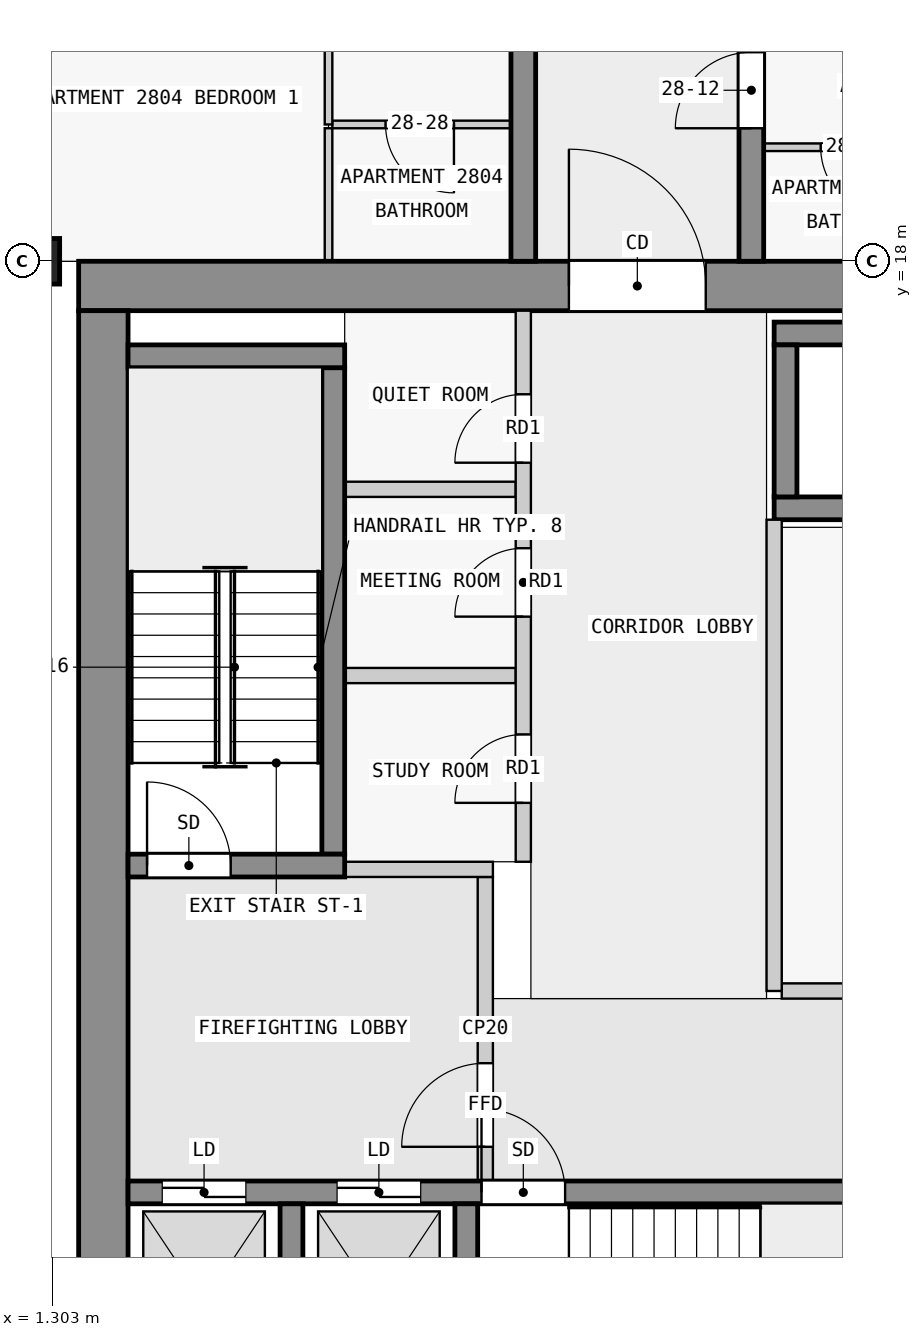
"""IFC4 building model, lengths in metres.
Left out: names, types, materials, properties, quantities, classifications, styles, units other than length and angle.
Written with IfcOpenShell. Run it as: python <this file> out.ifc"""

import sys

from ifc_helpers import new_model, si_unit, direction, frame, frame_2d, origin, origin_2d, place, context, subcontext, project, spatial, rectangle, extrude, element, fill, save


model = new_model("IFC4")
c1 = context("Model", 3, precision=1e-05, world=origin(), true_north=direction((0.0, 1.0)))
c2 = subcontext(c1, "Body", "Model", "MODEL_VIEW")
j1 = project(units=[si_unit("LENGTHUNIT", "METRE"), si_unit("PLANEANGLEUNIT", "RADIAN")], contexts=[c1])
p1 = place(None, origin())
s1 = spatial("IfcSite", under=j1, at=p1, CompositionType="ELEMENT")
p2 = place(p1, origin())
s2 = spatial("IfcBuilding", under=s1, at=p2, CompositionType="ELEMENT")
p3 = place(p2, frame((0.0, 0.0, 109.8)))
s3 = spatial("IfcBuildingStorey", under=s2, at=p3, CompositionType="ELEMENT", Elevation=109.8)
p4 = place(p3, frame((0.7, 18.0, 0.0), z_axis=(0.0, 0.0, 1.0), x_axis=(0.0, 1.0, 0.0)))
e1 = element("IfcColumn", 1, at=p4, inside=s3, PredefinedType="COLUMN", context=c2, shape_type="SweptSolid", body=[
    extrude(rectangle(XDim=0.6, YDim=1.4, at=origin_2d()), origin(), (0.0, 0.0, 1.0), 3.5),
])
p5 = place(p3, frame((1.65, 17.675, 0.0), z_axis=(0.0, 0.0, 1.0), x_axis=(1.0, 0.0, 0.0)))
e2 = element("IfcWall", 2, at=p5, inside=s3, PredefinedType="SHEAR", context=c2, shape_type="SweptSolid", body=[
    extrude(rectangle(XDim=20.85, YDim=0.65, at=frame_2d((10.425, 0.0))), origin(), (0.0, 0.0, 1.0), 3.25),
])
p6 = place(p5, frame((6.45, 0.0, 0.0)))
e3 = element("IfcOpeningElement", 3, at=p6, cuts=e2, PredefinedType="OPENING", context=c2, shape_type="SweptSolid", body=[
    extrude(rectangle(XDim=1.8, YDim=2.1, at=frame_2d((0.9, 1.05))), frame((0.0, 0.335, 0.0), z_axis=(0.0, -1.0, 0.0), x_axis=(1.0, 0.0, 0.0)), (0.0, 0.0, 1.0), 0.67),
])
p7 = place(p3, frame((1.975, 2.5, 0.0), z_axis=(0.0, 0.0, 1.0), x_axis=(0.0, 1.0, 0.0)))
e4 = element("IfcWall", 4, at=p7, inside=s3, PredefinedType="SHEAR", context=c2, shape_type="SweptSolid", body=[
    extrude(rectangle(XDim=14.85, YDim=0.65, at=frame_2d((7.425, 0.0))), origin(), (0.0, 0.0, 1.0), 3.25),
])
for number, where, z_axis, x_axis in (
    (5, (4.45, 2.8, 0.0), (0.0, 0.0, 1.0), (0.0, 1.0, 0.0)),
    (6, (6.75, 2.8, 0.0), (0.0, 0.0, 1.0), (0.0, 1.0, 0.0)),
):
    element("IfcWall", number, at=place(p3, frame(where, z_axis=z_axis, x_axis=x_axis)), inside=s3, PredefinedType="SHEAR", context=c2, shape_type="SweptSolid", body=[
        extrude(rectangle(XDim=2.8, YDim=0.3, at=frame_2d((1.4, 0.0))), origin(), (0.0, 0.0, 1.0), 3.25),
    ])
p8 = place(p3, frame((2.3, 5.75, 0.0), z_axis=(0.0, 0.0, 1.0), x_axis=(1.0, 0.0, 0.0)))
e7 = element("IfcWall", 7, at=p8, inside=s3, PredefinedType="SHEAR", context=c2, shape_type="SweptSolid", body=[
    extrude(rectangle(XDim=18.8, YDim=0.3, at=frame_2d((9.4, 0.0))), origin(), (0.0, 0.0, 1.0), 3.25),
])
p9 = place(p8, frame((4.65, 0.0, 0.0)))
e8 = element("IfcOpeningElement", 8, at=p9, cuts=e7, PredefinedType="OPENING", context=c2, shape_type="SweptSolid", body=[
    extrude(rectangle(XDim=1.1, YDim=2.1, at=frame_2d((0.55, 1.05))), frame((0.0, 0.16, 0.0), z_axis=(0.0, -1.0, 0.0), x_axis=(1.0, 0.0, 0.0)), (0.0, 0.0, 1.0), 0.32),
])
p10 = place(p8, frame((0.45, 0.0, 0.0)))
e9 = element("IfcOpeningElement", 9, at=p10, cuts=e7, PredefinedType="OPENING", context=c2, shape_type="SweptSolid", body=[
    extrude(rectangle(XDim=1.1, YDim=2.1, at=frame_2d((0.55, 1.05))), frame((0.0, 0.16, 0.0), z_axis=(0.0, -1.0, 0.0), x_axis=(1.0, 0.0, 0.0)), (0.0, 0.0, 1.0), 0.32),
])
p11 = place(p8, frame((2.75, 0.0, 0.0)))
e10 = element("IfcOpeningElement", 10, at=p11, cuts=e7, PredefinedType="OPENING", context=c2, shape_type="SweptSolid", body=[
    extrude(rectangle(XDim=1.1, YDim=2.1, at=frame_2d((0.55, 1.05))), frame((0.0, 0.16, 0.0), z_axis=(0.0, -1.0, 0.0), x_axis=(1.0, 0.0, 0.0)), (0.0, 0.0, 1.0), 0.32),
])
p12 = place(p8, frame((11.85, 0.0, 0.0)))
e11 = element("IfcOpeningElement", 11, at=p12, cuts=e7, PredefinedType="OPENING", context=c2, shape_type="SweptSolid", body=[
    extrude(rectangle(XDim=1.1, YDim=2.1, at=frame_2d((0.55, 1.05))), frame((0.0, 0.16, 0.0), z_axis=(0.0, -1.0, 0.0), x_axis=(1.0, 0.0, 0.0)), (0.0, 0.0, 1.0), 0.32),
])
p13 = place(p8, frame((14.35, 0.0, 0.0)))
e12 = element("IfcOpeningElement", 12, at=p13, cuts=e7, PredefinedType="OPENING", context=c2, shape_type="SweptSolid", body=[
    extrude(rectangle(XDim=1.1, YDim=2.1, at=frame_2d((0.55, 1.05))), frame((0.0, 0.16, 0.0), z_axis=(0.0, -1.0, 0.0), x_axis=(1.0, 0.0, 0.0)), (0.0, 0.0, 1.0), 0.32),
])
p14 = place(p8, frame((16.85, 0.0, 0.0)))
e13 = element("IfcOpeningElement", 13, at=p14, cuts=e7, PredefinedType="OPENING", context=c2, shape_type="SweptSolid", body=[
    extrude(rectangle(XDim=1.1, YDim=2.1, at=frame_2d((0.55, 1.05))), frame((0.0, 0.16, 0.0), z_axis=(0.0, -1.0, 0.0), x_axis=(1.0, 0.0, 0.0)), (0.0, 0.0, 1.0), 0.32),
])
p15 = place(p3, frame((2.3, 10.05, 0.0), z_axis=(0.0, 0.0, 1.0), x_axis=(1.0, 0.0, 0.0)))
e14 = element("IfcWall", 14, at=p15, inside=s3, PredefinedType="SHEAR", context=c2, shape_type="SweptSolid", body=[
    extrude(rectangle(XDim=2.85, YDim=0.3, at=frame_2d((1.425, 0.0))), origin(), (0.0, 0.0, 1.0), 3.25),
])
p16 = place(p15, frame((0.25, 0.0, 0.0)))
e15 = element("IfcOpeningElement", 15, at=p16, cuts=e14, PredefinedType="OPENING", context=c2, shape_type="SweptSolid", body=[
    extrude(rectangle(XDim=1.1, YDim=2.1, at=frame_2d((0.55, 1.05))), frame((0.0, 0.16, 0.0), z_axis=(0.0, -1.0, 0.0), x_axis=(1.0, 0.0, 0.0)), (0.0, 0.0, 1.0), 0.32),
])
p17 = place(p3, frame((5.0, 10.2, 0.0), z_axis=(0.0, 0.0, 1.0), x_axis=(0.0, 1.0, 0.0)))
e16 = element("IfcWall", 16, at=p17, inside=s3, PredefinedType="SHEAR", context=c2, shape_type="SweptSolid", body=[
    extrude(rectangle(XDim=6.4, YDim=0.3, at=frame_2d((3.2, 0.0))), origin(), (0.0, 0.0, 1.0), 3.25),
])
p18 = place(p3, frame((2.3, 16.75, 0.0), z_axis=(0.0, 0.0, 1.0), x_axis=(1.0, 0.0, 0.0)))
e17 = element("IfcWall", 17, at=p18, inside=s3, PredefinedType="SHEAR", context=c2, shape_type="SweptSolid", body=[
    extrude(rectangle(XDim=2.85, YDim=0.3, at=frame_2d((1.425, 0.0))), origin(), (0.0, 0.0, 1.0), 3.25),
])
for number, where, z_axis, x_axis in (
    (18, (10.8, 17.05, 0.0), (0.0, 0.0, 1.0), (1.0, 0.0, 0.0)),
    (19, (10.8, 14.75, 0.0), (0.0, 0.0, 1.0), (1.0, 0.0, 0.0)),
):
    element("IfcWall", number, at=place(p3, frame(where, z_axis=z_axis, x_axis=x_axis)), inside=s3, PredefinedType="SHEAR", context=c2, shape_type="SweptSolid", body=[
        extrude(rectangle(XDim=7.8, YDim=0.3, at=frame_2d((3.9, 0.0))), origin(), (0.0, 0.0, 1.0), 3.25),
    ])
p19 = place(p3, frame((10.95, 14.9, 0.0), z_axis=(0.0, 0.0, 1.0), x_axis=(0.0, 1.0, 0.0)))
e20 = element("IfcWall", 20, at=p19, inside=s3, PredefinedType="SHEAR", context=c2, shape_type="SweptSolid", body=[
    extrude(rectangle(XDim=2.0, YDim=0.3, at=frame_2d((1.0, 0.0))), origin(), (0.0, 0.0, 1.0), 3.25),
])
p20 = place(p3, frame((7.5, 18.0, 0.0), z_axis=(0.0, 0.0, 1.0), x_axis=(0.0, 1.0, 0.0)))
e21 = element("IfcWall", 21, at=p20, inside=s3, PredefinedType="SHEAR", context=c2, shape_type="SweptSolid", body=[
    extrude(rectangle(XDim=27.0, YDim=0.325, at=frame_2d((13.5, 0.0))), origin(), (0.0, 0.0, 1.0), 3.25),
])
p21 = place(p20, frame((5.65, 0.0, 0.0)))
e22 = element("IfcOpeningElement", 22, at=p21, cuts=e21, PredefinedType="OPENING", context=c2, shape_type="SweptSolid", body=[
    extrude(rectangle(XDim=1.0, YDim=2.1, at=frame_2d((0.5, 1.05))), frame((0.0, 0.172, 0.0), z_axis=(0.0, -1.0, 0.0), x_axis=(1.0, 0.0, 0.0)), (0.0, 0.0, 1.0), 0.345),
])
p22 = place(p20, frame((15.35, 0.0, 0.0)))
e23 = element("IfcOpeningElement", 23, at=p22, cuts=e21, PredefinedType="OPENING", context=c2, shape_type="SweptSolid", body=[
    extrude(rectangle(XDim=0.9, YDim=2.1, at=frame_2d((0.45, 1.05))), frame((0.0, 0.172, 0.0), z_axis=(0.0, -1.0, 0.0), x_axis=(1.0, 0.0, 0.0)), (0.0, 0.0, 1.0), 0.345),
])
p23 = place(p20, frame((21.35, 0.0, 0.0)))
e24 = element("IfcOpeningElement", 24, at=p23, cuts=e21, PredefinedType="OPENING", context=c2, shape_type="SweptSolid", body=[
    extrude(rectangle(XDim=1.0, YDim=2.1, at=frame_2d((0.5, 1.05))), frame((0.0, 0.172, 0.0), z_axis=(0.0, -1.0, 0.0), x_axis=(1.0, 0.0, 0.0)), (0.0, 0.0, 1.0), 0.345),
])
p24 = place(p3, frame((10.5, 18.0, 0.0), z_axis=(0.0, 0.0, 1.0), x_axis=(0.0, 1.0, 0.0)))
e25 = element("IfcWall", 25, at=p24, inside=s3, PredefinedType="SHEAR", context=c2, shape_type="SweptSolid", body=[
    extrude(rectangle(XDim=27.0, YDim=0.325, at=frame_2d((13.5, 0.0))), origin(), (0.0, 0.0, 1.0), 3.25),
])
p25 = place(p24, frame((1.75, 0.0, 0.0)))
e26 = element("IfcOpeningElement", 26, at=p25, cuts=e25, PredefinedType="OPENING", context=c2, shape_type="SweptSolid", body=[
    extrude(rectangle(XDim=1.0, YDim=2.1, at=frame_2d((0.5, 1.05))), frame((0.0, 0.172, 0.0), z_axis=(0.0, -1.0, 0.0), x_axis=(1.0, 0.0, 0.0)), (0.0, 0.0, 1.0), 0.345),
])
p26 = place(p24, frame((8.55, 0.0, 0.0)))
e27 = element("IfcOpeningElement", 27, at=p26, cuts=e25, PredefinedType="OPENING", context=c2, shape_type="SweptSolid", body=[
    extrude(rectangle(XDim=1.0, YDim=2.1, at=frame_2d((0.5, 1.05))), frame((0.0, 0.172, 0.0), z_axis=(0.0, -1.0, 0.0), x_axis=(1.0, 0.0, 0.0)), (0.0, 0.0, 1.0), 0.345),
])
p27 = place(p24, frame((15.35, 0.0, 0.0)))
e28 = element("IfcOpeningElement", 28, at=p27, cuts=e25, PredefinedType="OPENING", context=c2, shape_type="SweptSolid", body=[
    extrude(rectangle(XDim=0.9, YDim=2.1, at=frame_2d((0.45, 1.05))), frame((0.0, 0.172, 0.0), z_axis=(0.0, -1.0, 0.0), x_axis=(1.0, 0.0, 0.0)), (0.0, 0.0, 1.0), 0.345),
])
p28 = place(p24, frame((19.75, 0.0, 0.0)))
e29 = element("IfcOpeningElement", 29, at=p28, cuts=e25, PredefinedType="OPENING", context=c2, shape_type="SweptSolid", body=[
    extrude(rectangle(XDim=1.0, YDim=2.1, at=frame_2d((0.5, 1.05))), frame((0.0, 0.172, 0.0), z_axis=(0.0, -1.0, 0.0), x_axis=(1.0, 0.0, 0.0)), (0.0, 0.0, 1.0), 0.345),
])
p29 = place(p24, frame((23.25, 0.0, 0.0)))
e30 = element("IfcOpeningElement", 30, at=p29, cuts=e25, PredefinedType="OPENING", context=c2, shape_type="SweptSolid", body=[
    extrude(rectangle(XDim=0.9, YDim=2.1, at=frame_2d((0.45, 1.05))), frame((0.0, 0.172, 0.0), z_axis=(0.0, -1.0, 0.0), x_axis=(1.0, 0.0, 0.0)), (0.0, 0.0, 1.0), 0.345),
])
p30 = place(p24, frame((25.45, 0.0, 0.0)))
e31 = element("IfcOpeningElement", 31, at=p30, cuts=e25, PredefinedType="OPENING", context=c2, shape_type="SweptSolid", body=[
    extrude(rectangle(XDim=1.0, YDim=2.1, at=frame_2d((0.5, 1.05))), frame((0.0, 0.172, 0.0), z_axis=(0.0, -1.0, 0.0), x_axis=(1.0, 0.0, 0.0)), (0.0, 0.0, 1.0), 0.345),
])
p31 = place(p3, frame((7.0, 5.9, 0.0), z_axis=(0.0, 0.0, 1.0), x_axis=(0.0, 1.0, 0.0)))
e32 = element("IfcWall", 32, at=p31, inside=s3, PredefinedType="PARTITIONING", context=c2, shape_type="SweptSolid", body=[
    extrude(rectangle(XDim=4.0, YDim=0.2, at=frame_2d((2.0, 0.0))), origin(), (0.0, 0.0, 1.0), 3.25),
])
p32 = place(p31, frame((0.45, 0.0, 0.0)))
e33 = element("IfcOpeningElement", 33, at=p32, cuts=e32, PredefinedType="OPENING", context=c2, shape_type="SweptSolid", body=[
    extrude(rectangle(XDim=1.1, YDim=2.1, at=frame_2d((0.55, 1.05))), frame((0.0, 0.11, 0.0), z_axis=(0.0, -1.0, 0.0), x_axis=(1.0, 0.0, 0.0)), (0.0, 0.0, 1.0), 0.22),
])
p33 = place(p3, frame((5.15, 10.0, 0.0), z_axis=(0.0, 0.0, 1.0), x_axis=(1.0, 0.0, 0.0)))
e34 = element("IfcWall", 34, at=p33, inside=s3, PredefinedType="PARTITIONING", context=c2, shape_type="SweptSolid", body=[
    extrude(rectangle(XDim=1.95, YDim=0.2, at=frame_2d((0.975, 0.0))), origin(), (0.0, 0.0, 1.0), 3.25),
])
p34 = place(p3, frame((10.8, 8.4, 0.0), z_axis=(0.0, 0.0, 1.0), x_axis=(0.0, 1.0, 0.0)))
e35 = element("IfcWall", 35, at=p34, inside=s3, PredefinedType="PARTITIONING", context=c2, shape_type="SweptSolid", body=[
    extrude(rectangle(XDim=6.2, YDim=0.2, at=frame_2d((3.1, 0.0))), origin(), (0.0, 0.0, 1.0), 3.25),
])
p35 = place(p3, frame((10.9, 8.4, 0.0), z_axis=(0.0, 0.0, 1.0), x_axis=(1.0, 0.0, 0.0)))
e36 = element("IfcWall", 36, at=p35, inside=s3, PredefinedType="PARTITIONING", context=c2, shape_type="SweptSolid", body=[
    extrude(rectangle(XDim=7.4, YDim=0.2, at=frame_2d((3.7, 0.0))), origin(), (0.0, 0.0, 1.0), 3.25),
])
p36 = place(p3, frame((7.5, 10.1, 0.0), z_axis=(0.0, 0.0, 1.0), x_axis=(0.0, 1.0, 0.0)))
e37 = element("IfcWall", 37, at=p36, inside=s3, PredefinedType="PARTITIONING", context=c2, shape_type="SweptSolid", body=[
    extrude(rectangle(XDim=7.25, YDim=0.2, at=frame_2d((3.625, 0.0))), origin(), (0.0, 0.0, 1.0), 3.25),
])
p37 = place(p36, frame((0.775, 0.0, 0.0)))
e38 = element("IfcOpeningElement", 38, at=p37, cuts=e37, PredefinedType="OPENING", context=c2, shape_type="SweptSolid", body=[
    extrude(rectangle(XDim=0.9, YDim=2.1, at=frame_2d((0.45, 1.05))), frame((0.0, 0.11, 0.0), z_axis=(0.0, -1.0, 0.0), x_axis=(1.0, 0.0, 0.0)), (0.0, 0.0, 1.0), 0.22),
])
p38 = place(p36, frame((3.225, 0.0, 0.0)))
e39 = element("IfcOpeningElement", 39, at=p38, cuts=e37, PredefinedType="OPENING", context=c2, shape_type="SweptSolid", body=[
    extrude(rectangle(XDim=0.9, YDim=2.1, at=frame_2d((0.45, 1.05))), frame((0.0, 0.11, 0.0), z_axis=(0.0, -1.0, 0.0), x_axis=(1.0, 0.0, 0.0)), (0.0, 0.0, 1.0), 0.22),
])
p39 = place(p36, frame((5.25, 0.0, 0.0)))
e40 = element("IfcOpeningElement", 40, at=p39, cuts=e37, PredefinedType="OPENING", context=c2, shape_type="SweptSolid", body=[
    extrude(rectangle(XDim=0.9, YDim=2.1, at=frame_2d((0.45, 1.05))), frame((0.0, 0.11, 0.0), z_axis=(0.0, -1.0, 0.0), x_axis=(1.0, 0.0, 0.0)), (0.0, 0.0, 1.0), 0.22),
])
for number, where, z_axis, x_axis in (
    (41, (5.15, 12.55, 0.0), (0.0, 0.0, 1.0), (1.0, 0.0, 0.0)),
    (42, (5.15, 15.0, 0.0), (0.0, 0.0, 1.0), (1.0, 0.0, 0.0)),
):
    element("IfcWall", number, at=place(p3, frame(where, z_axis=z_axis, x_axis=x_axis)), inside=s3, PredefinedType="PARTITIONING", context=c2, shape_type="SweptSolid", body=[
        extrude(rectangle(XDim=2.25, YDim=0.2, at=frame_2d((1.125, 0.0))), origin(), (0.0, 0.0, 1.0), 3.25),
    ])
p40 = place(p3, frame((13.062, 19.5, 0.0), z_axis=(0.0, 0.0, 1.0), x_axis=(-1.0, 0.0, 0.0)))
e43 = element("IfcWall", 43, at=p40, inside=s3, PredefinedType="PARTITIONING", context=c2, shape_type="SweptSolid", body=[
    extrude(rectangle(XDim=2.4, YDim=0.1, at=frame_2d((1.2, 0.0))), origin(), (0.0, 0.0, 1.0), 3.25),
])
p41 = place(p40, frame((0.75, 0.0, 0.0)))
e44 = element("IfcOpeningElement", 44, at=p41, cuts=e43, PredefinedType="OPENING", context=c2, shape_type="SweptSolid", body=[
    extrude(rectangle(XDim=0.9, YDim=2.1, at=frame_2d((0.45, 1.05))), frame((0.0, 0.06, 0.0), z_axis=(0.0, -1.0, 0.0), x_axis=(1.0, 0.0, 0.0)), (0.0, 0.0, 1.0), 0.12),
])
p42 = place(p3, frame((7.337, 19.8, 0.0), z_axis=(0.0, 0.0, 1.0), x_axis=(-1.0, 0.0, 0.0)))
e45 = element("IfcWall", 45, at=p42, inside=s3, PredefinedType="PARTITIONING", context=c2, shape_type="SweptSolid", body=[
    extrude(rectangle(XDim=2.35, YDim=0.1, at=frame_2d((1.175, 0.0))), origin(), (0.0, 0.0, 1.0), 3.25),
])
p43 = place(p42, frame((0.75, 0.0, 0.0)))
e46 = element("IfcOpeningElement", 46, at=p43, cuts=e45, PredefinedType="OPENING", context=c2, shape_type="SweptSolid", body=[
    extrude(rectangle(XDim=0.9, YDim=2.1, at=frame_2d((0.45, 1.05))), frame((0.0, 0.06, 0.0), z_axis=(0.0, -1.0, 0.0), x_axis=(1.0, 0.0, 0.0)), (0.0, 0.0, 1.0), 0.12),
])
p44 = place(p3, frame((4.938, 19.75, 0.0), z_axis=(0.0, 0.0, 1.0), x_axis=(0.0, -1.0, 0.0)))
e47 = element("IfcWall", 47, at=p44, inside=s3, PredefinedType="PARTITIONING", context=c2, shape_type="SweptSolid", body=[
    extrude(rectangle(XDim=1.75, YDim=0.1, at=frame_2d((0.875, 0.0))), origin(), (0.0, 0.0, 1.0), 3.25),
])
p45 = place(p3, frame((4.938, 19.8, 0.0), z_axis=(0.0, 0.0, 1.0), x_axis=(0.0, 1.0, 0.0)))
e48 = element("IfcWall", 48, at=p45, inside=s3, PredefinedType="PARTITIONING", context=c2, shape_type="SweptSolid", body=[
    extrude(rectangle(XDim=2.65, YDim=0.1, at=frame_2d((1.325, 0.0))), origin(), (0.0, 0.0, 1.0), 3.25),
])
p46 = place(p32, origin())
e49 = element("IfcDoor", 49, at=p46, inside=s3, OperationType="SINGLE_SWING_LEFT", PredefinedType="DOOR", context=c2, shape_type="SweptSolid", body=[
    extrude(rectangle(XDim=1.1, YDim=2.1, at=frame_2d((0.55, 1.05))), frame((0.0, 0.025, 0.0), z_axis=(0.0, -1.0, 0.0), x_axis=(1.0, 0.0, 0.0)), (0.0, 0.0, 1.0), 0.05),
])
fill(e33, e49)
p47 = place(p16, origin())
e50 = element("IfcDoor", 50, at=p47, inside=s3, OperationType="SINGLE_SWING_RIGHT", PredefinedType="DOOR", context=c2, shape_type="SweptSolid", body=[
    extrude(rectangle(XDim=1.1, YDim=2.1, at=frame_2d((0.55, 1.05))), frame((0.0, 0.025, 0.0), z_axis=(0.0, -1.0, 0.0), x_axis=(1.0, 0.0, 0.0)), (0.0, 0.0, 1.0), 0.05),
])
fill(e15, e50)
p48 = place(p9, origin())
e51 = element("IfcDoor", 51, at=p48, inside=s3, OperationType="SINGLE_SWING_LEFT", PredefinedType="DOOR", context=c2, shape_type="SweptSolid", body=[
    extrude(rectangle(XDim=1.1, YDim=2.1, at=frame_2d((0.55, 1.05))), frame((0.0, 0.025, 0.0), z_axis=(0.0, -1.0, 0.0), x_axis=(1.0, 0.0, 0.0)), (0.0, 0.0, 1.0), 0.05),
])
fill(e8, e51)
p49 = place(p10, origin())
e52 = element("IfcDoor", 52, at=p49, inside=s3, OperationType="DOUBLE_DOOR_SLIDING", PredefinedType="DOOR", context=c2, shape_type="SweptSolid", body=[
    extrude(rectangle(XDim=1.1, YDim=2.1, at=frame_2d((0.55, 1.05))), frame((0.0, 0.025, 0.0), z_axis=(0.0, -1.0, 0.0), x_axis=(1.0, 0.0, 0.0)), (0.0, 0.0, 1.0), 0.05),
])
fill(e9, e52)
p50 = place(p11, origin())
e53 = element("IfcDoor", 53, at=p50, inside=s3, OperationType="DOUBLE_DOOR_SLIDING", PredefinedType="DOOR", context=c2, shape_type="SweptSolid", body=[
    extrude(rectangle(XDim=1.1, YDim=2.1, at=frame_2d((0.55, 1.05))), frame((0.0, 0.025, 0.0), z_axis=(0.0, -1.0, 0.0), x_axis=(1.0, 0.0, 0.0)), (0.0, 0.0, 1.0), 0.05),
])
fill(e10, e53)
p51 = place(p6, origin())
e54 = element("IfcDoor", 54, at=p51, inside=s3, OperationType="DOUBLE_DOOR_SINGLE_SWING", PredefinedType="DOOR", context=c2, shape_type="SweptSolid", body=[
    extrude(rectangle(XDim=1.8, YDim=2.1, at=frame_2d((0.9, 1.05))), frame((0.0, 0.025, 0.0), z_axis=(0.0, -1.0, 0.0), x_axis=(1.0, 0.0, 0.0)), (0.0, 0.0, 1.0), 0.05),
])
fill(e3, e54)
p52 = place(p37, origin())
e55 = element("IfcDoor", 55, at=p52, inside=s3, OperationType="SINGLE_SWING_RIGHT", PredefinedType="DOOR", context=c2, shape_type="SweptSolid", body=[
    extrude(rectangle(XDim=0.9, YDim=2.1, at=frame_2d((0.45, 1.05))), frame((0.0, 0.025, 0.0), z_axis=(0.0, -1.0, 0.0), x_axis=(1.0, 0.0, 0.0)), (0.0, 0.0, 1.0), 0.05),
])
fill(e38, e55)
p53 = place(p38, origin())
e56 = element("IfcDoor", 56, at=p53, inside=s3, OperationType="SINGLE_SWING_RIGHT", PredefinedType="DOOR", context=c2, shape_type="SweptSolid", body=[
    extrude(rectangle(XDim=0.9, YDim=2.1, at=frame_2d((0.45, 1.05))), frame((0.0, 0.025, 0.0), z_axis=(0.0, -1.0, 0.0), x_axis=(1.0, 0.0, 0.0)), (0.0, 0.0, 1.0), 0.05),
])
fill(e39, e56)
p54 = place(p39, origin())
e57 = element("IfcDoor", 57, at=p54, inside=s3, OperationType="SINGLE_SWING_RIGHT", PredefinedType="DOOR", context=c2, shape_type="SweptSolid", body=[
    extrude(rectangle(XDim=0.9, YDim=2.1, at=frame_2d((0.45, 1.05))), frame((0.0, 0.025, 0.0), z_axis=(0.0, -1.0, 0.0), x_axis=(1.0, 0.0, 0.0)), (0.0, 0.0, 1.0), 0.05),
])
fill(e40, e57)
p55 = place(p25, origin())
e58 = element("IfcDoor", 58, at=p55, inside=s3, OperationType="SINGLE_SWING_LEFT", PredefinedType="DOOR", context=c2, shape_type="SweptSolid", body=[
    extrude(rectangle(XDim=1.0, YDim=2.1, at=frame_2d((0.5, 1.05))), frame((0.0, 0.025, 0.0), z_axis=(0.0, -1.0, 0.0), x_axis=(1.0, 0.0, 0.0)), (0.0, 0.0, 1.0), 0.05),
])
fill(e26, e58)
p56 = place(p43, origin())
e59 = element("IfcDoor", 59, at=p56, inside=s3, OperationType="SINGLE_SWING_RIGHT", PredefinedType="DOOR", context=c2, shape_type="SweptSolid", body=[
    extrude(rectangle(XDim=0.9, YDim=2.1, at=frame_2d((0.45, 1.05))), frame((0.0, 0.025, 0.0), z_axis=(0.0, -1.0, 0.0), x_axis=(1.0, 0.0, 0.0)), (0.0, 0.0, 1.0), 0.05),
])
fill(e46, e59)
p57 = place(p41, origin())
e60 = element("IfcDoor", 60, at=p57, inside=s3, OperationType="SINGLE_SWING_LEFT", PredefinedType="DOOR", context=c2, shape_type="SweptSolid", body=[
    extrude(rectangle(XDim=0.9, YDim=2.1, at=frame_2d((0.45, 1.05))), frame((0.0, 0.025, 0.0), z_axis=(0.0, -1.0, 0.0), x_axis=(1.0, 0.0, 0.0)), (0.0, 0.0, 1.0), 0.05),
])
fill(e44, e60)
save(model, sys.argv[1])
